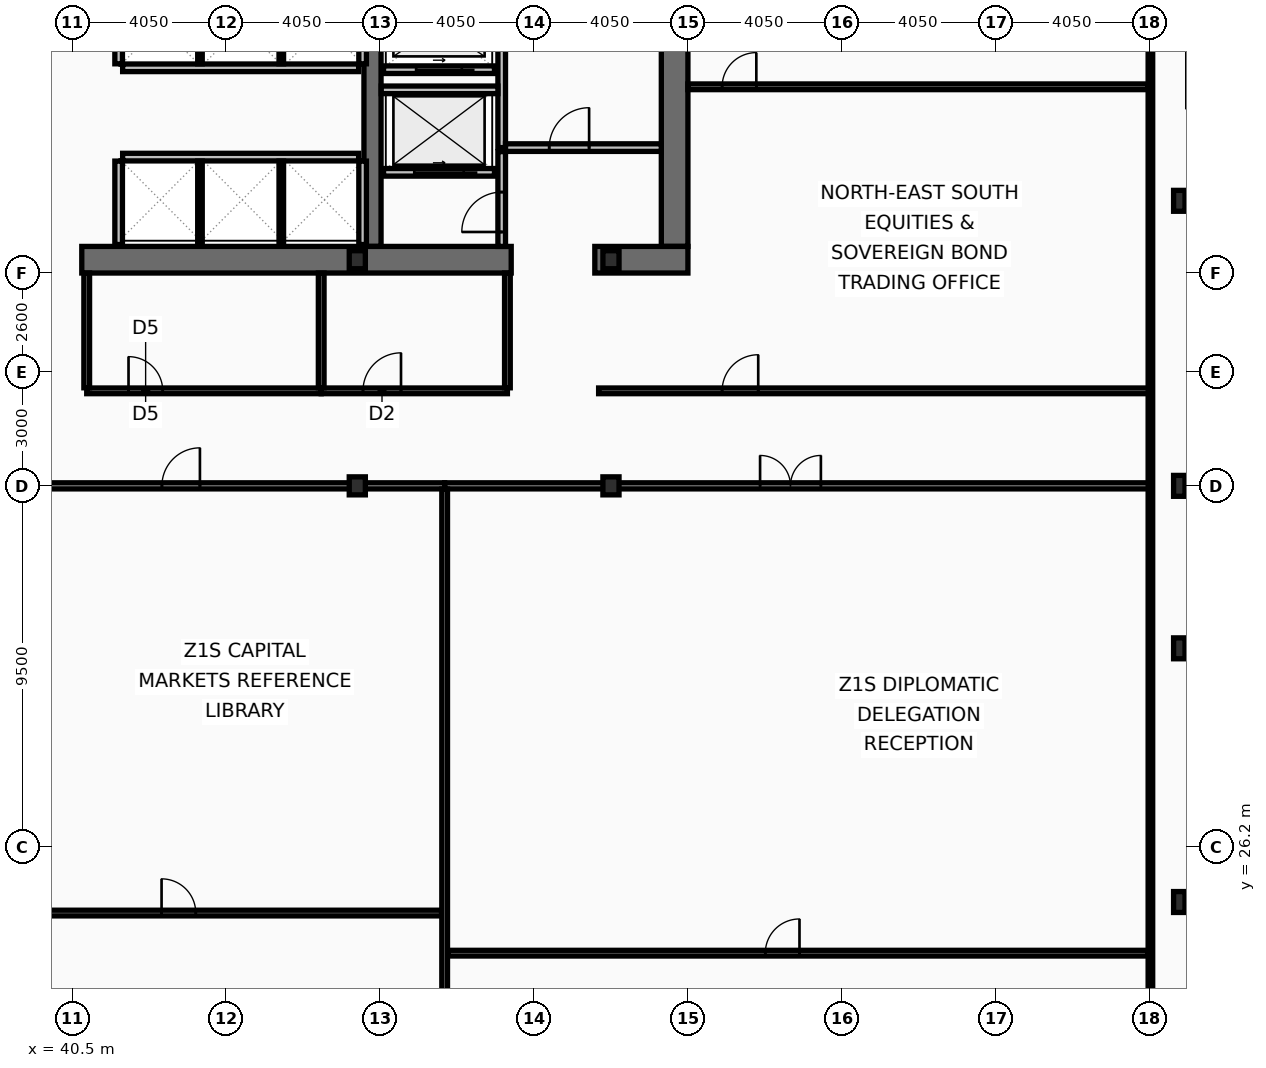
"""IFC4 building model, lengths in metres.
Left out: names, types, materials, properties, quantities, classifications, styles, units other than length and angle.
Written with IfcOpenShell. Run it as: python <this file> out.ifc"""

import sys

from ifc_helpers import new_model, si_unit, direction, frame, frame_2d, origin, origin_2d, place, context, subcontext, project, spatial, rectangle, i_section, extrude, element, fill, save


model = new_model("IFC4")
c1 = context("Model", 3, precision=1e-05, world=origin(), true_north=direction((0.0, 1.0)))
c2 = subcontext(c1, "Body", "Model", "MODEL_VIEW")
j1 = project(units=[si_unit("LENGTHUNIT", "METRE"), si_unit("PLANEANGLEUNIT", "RADIAN")], contexts=[c1])
p1 = place(None, origin())
s1 = spatial("IfcSite", under=j1, at=p1, CompositionType="ELEMENT")
p2 = place(p1, origin())
s2 = spatial("IfcBuilding", under=s1, at=p2, CompositionType="ELEMENT")
p3 = place(p2, frame((0.0, 0.0, 90.6)))
s3 = spatial("IfcBuildingStorey", under=s2, at=p3, CompositionType="ELEMENT", Elevation=90.6)
p4 = place(p3, frame((56.35, 53.0, 0.0), z_axis=(0.0, 0.0, 1.0), x_axis=(0.0, -1.0, 0.0)))
e1 = element("IfcWall", 1, at=p4, inside=s3, PredefinedType="SHEAR", context=c2, shape_type="SweptSolid", body=[
    extrude(rectangle(XDim=11.0, YDim=0.7, at=frame_2d((5.5, 0.0))), origin(), (0.0, 0.0, 1.0), 3.82),
])
p5 = place(p3, frame((48.4, 42.0, 0.0), z_axis=(0.0, 0.0, 1.0), x_axis=(0.0, 1.0, 0.0)))
e2 = element("IfcWall", 2, at=p5, inside=s3, PredefinedType="SHEAR", context=c2, shape_type="SweptSolid", body=[
    extrude(rectangle(XDim=11.0, YDim=0.45, at=frame_2d((5.5, 0.0))), origin(), (0.0, 0.0, 1.0), 3.82),
])
p6 = place(p3, frame((52.05, 41.65, 0.0), z_axis=(0.0, 0.0, 1.0), x_axis=(-1.0, 0.0, 0.0)))
e3 = element("IfcWall", 3, at=p6, inside=s3, PredefinedType="SHEAR", context=c2, shape_type="SweptSolid", body=[
    extrude(rectangle(XDim=11.3, YDim=0.7, at=frame_2d((5.65, 0.0))), origin(), (0.0, 0.0, 1.0), 3.82),
])
p7 = place(p3, frame((56.7, 41.65, 0.0), z_axis=(0.0, 0.0, 1.0), x_axis=(-1.0, 0.0, 0.0)))
e4 = element("IfcWall", 4, at=p7, inside=s3, PredefinedType="SHEAR", context=c2, shape_type="SweptSolid", body=[
    extrude(rectangle(XDim=2.45, YDim=0.7, at=frame_2d((1.225, 0.0))), origin(), (0.0, 0.0, 1.0), 3.82),
])
for number, where, z_axis, x_axis in (
    (5, (69.63, 24.75, 0.0), (0.0, 0.0, 1.0), (1.0, 0.0, 0.0)),
    (6, (69.63, 31.425, 0.0), (0.0, 0.0, 1.0), (1.0, 0.0, 0.0)),
    (7, (69.63, 35.7, 0.0), (0.0, 0.0, 1.0), (1.0, 0.0, 0.0)),
    (8, (69.63, 43.2, 0.0), (0.0, 0.0, 1.0), (1.0, 0.0, 0.0)),
):
    element("IfcColumn", number, at=place(p3, frame(where, z_axis=z_axis, x_axis=x_axis)), inside=s3, PredefinedType="COLUMN", context=c2, shape_type="SweptSolid", body=[
        extrude(i_section(OverallWidth=0.3, OverallDepth=0.55, WebThickness=0.015, FlangeThickness=0.029, at=origin_2d()), origin(), (0.0, 0.0, 1.0), 4.0),
    ])
for number, where, z_axis, x_axis in (
    (9, (48.0, 35.7, 0.0), (0.0, 0.0, 1.0), (1.0, 0.0, 0.0)),
    (10, (48.0, 41.65, 0.0), (0.0, 0.0, 1.0), (1.0, 0.0, 0.0)),
    (11, (54.675, 35.7, 0.0), (0.0, 0.0, 1.0), (1.0, 0.0, 0.0)),
    (12, (54.675, 41.65, 0.0), (0.0, 0.0, 1.0), (1.0, 0.0, 0.0)),
):
    element("IfcColumn", number, at=place(p3, frame(where, z_axis=z_axis, x_axis=x_axis)), inside=s3, PredefinedType="COLUMN", context=c2, shape_type="SweptSolid", body=[
        extrude(i_section(OverallWidth=0.424, OverallDepth=0.474, WebThickness=0.048, FlangeThickness=0.077, at=origin_2d()), origin(), (0.0, 0.0, 1.0), 4.0),
    ])
p8 = place(p3, frame((51.61, 43.95, 0.0), z_axis=(0.0, 0.0, 1.0), x_axis=(-1.0, 0.0, 0.0)))
e13 = element("IfcWall", 13, at=p8, inside=s3, PredefinedType="PARTITIONING", context=c2, shape_type="SweptSolid", body=[
    extrude(rectangle(XDim=2.92, YDim=0.2, at=frame_2d((1.46, 0.0))), origin(), (0.0, 0.0, 1.0), 3.82),
])
p9 = place(p8, frame((0.81, 0.0, 0.0)))
e14 = element("IfcOpeningElement", 14, at=p9, cuts=e13, PredefinedType="OPENING", context=c2, shape_type="SweptSolid", body=[
    extrude(rectangle(XDim=1.3, YDim=2.18, at=frame_2d((0.65, 1.09))), frame((0.0, 0.11, 0.0), z_axis=(0.0, -1.0, 0.0), x_axis=(1.0, 0.0, 0.0)), (0.0, 0.0, 1.0), 0.22),
])
p10 = place(p3, frame((51.61, 46.65, 0.0), z_axis=(0.0, 0.0, 1.0), x_axis=(-1.0, 0.0, 0.0)))
e15 = element("IfcWall", 15, at=p10, inside=s3, PredefinedType="PARTITIONING", context=c2, shape_type="SweptSolid", body=[
    extrude(rectangle(XDim=2.92, YDim=0.2, at=frame_2d((1.46, 0.0))), origin(), (0.0, 0.0, 1.0), 3.82),
])
p11 = place(p10, frame((0.86, 0.0, 0.0)))
e16 = element("IfcOpeningElement", 16, at=p11, cuts=e15, PredefinedType="OPENING", context=c2, shape_type="SweptSolid", body=[
    extrude(rectangle(XDim=1.2, YDim=2.18, at=frame_2d((0.6, 1.09))), frame((0.0, 0.11, 0.0), z_axis=(0.0, -1.0, 0.0), x_axis=(1.0, 0.0, 0.0)), (0.0, 0.0, 1.0), 0.22),
])
p12 = place(p3, frame((51.8, 44.6, 0.0), z_axis=(0.0, 0.0, 1.0), x_axis=(0.0, 1.0, 0.0)))
e17 = element("IfcWall", 17, at=p12, inside=s3, PredefinedType="PARTITIONING", context=c2, shape_type="SweptSolid", body=[
    extrude(rectangle(XDim=4.3, YDim=0.2, at=frame_2d((2.15, 0.0))), origin(), (0.0, 0.0, 1.0), 3.82),
])
p13 = place(p3, frame((51.9, 44.6, 0.0), z_axis=(0.0, 0.0, 1.0), x_axis=(1.0, 0.0, 0.0)))
e18 = element("IfcWall", 18, at=p13, inside=s3, PredefinedType="PARTITIONING", context=c2, shape_type="SweptSolid", body=[
    extrude(rectangle(XDim=4.1, YDim=0.2, at=frame_2d((2.05, 0.0))), origin(), (0.0, 0.0, 1.0), 3.82),
])
p14 = place(p13, frame((1.15, 0.0, 0.0)))
e19 = element("IfcOpeningElement", 19, at=p14, cuts=e18, PredefinedType="OPENING", context=c2, shape_type="SweptSolid", body=[
    extrude(rectangle(XDim=1.05, YDim=2.15, at=frame_2d((0.525, 1.075))), frame((0.0, 0.11, 0.0), z_axis=(0.0, -1.0, 0.0), x_axis=(1.0, 0.0, 0.0)), (0.0, 0.0, 1.0), 0.22),
])
p15 = place(p3, frame((48.63, 46.12, 0.0), z_axis=(0.0, 0.0, 1.0), x_axis=(1.0, 0.0, 0.0)))
e20 = element("IfcWall", 20, at=p15, inside=s3, PredefinedType="PARTITIONING", context=c2, shape_type="SweptSolid", body=[
    extrude(rectangle(XDim=3.07, YDim=0.2, at=frame_2d((1.535, 0.0))), origin(), (0.0, 0.0, 1.0), 3.82),
])
p16 = place(p3, frame((51.8, 42.0, 0.0), z_axis=(0.0, 0.0, 1.0), x_axis=(0.0, 1.0, 0.0)))
e21 = element("IfcWall", 21, at=p16, inside=s3, PredefinedType="PARTITIONING", context=c2, shape_type="SweptSolid", body=[
    extrude(rectangle(XDim=2.495, YDim=0.2, at=frame_2d((1.248, 0.0))), origin(), (0.0, 0.0, 1.0), 3.82),
])
p17 = place(p16, frame((0.38, 0.0, 0.0)))
e22 = element("IfcOpeningElement", 22, at=p17, cuts=e21, PredefinedType="OPENING", context=c2, shape_type="SweptSolid", body=[
    extrude(rectangle(XDim=1.05, YDim=2.15, at=frame_2d((0.525, 1.075))), frame((0.0, 0.11, 0.0), z_axis=(0.0, -1.0, 0.0), x_axis=(1.0, 0.0, 0.0)), (0.0, 0.0, 1.0), 0.22),
])
p18 = place(p3, frame((41.825, 46.7, 0.0), z_axis=(0.0, 0.0, 1.0), x_axis=(1.0, 0.0, 0.0)))
e23 = element("IfcWall", 23, at=p18, inside=s3, PredefinedType="PARTITIONING", context=c2, shape_type="SweptSolid", body=[
    extrude(rectangle(XDim=6.21, YDim=0.2, at=frame_2d((3.105, 0.0))), origin(), (0.0, 0.0, 1.0), 3.82),
])
for number, where, z_axis, x_axis in (
    (24, (41.72, 46.805, 0.0), (0.0, 0.0, 1.0), (0.0, 1.0, 0.0)),
    (25, (48.14, 46.805, 0.0), (0.0, 0.0, 1.0), (0.0, 1.0, 0.0)),
):
    element("IfcWall", number, at=place(p3, frame(where, z_axis=z_axis, x_axis=x_axis)), inside=s3, PredefinedType="PARTITIONING", context=c2, shape_type="SweptSolid", body=[
        extrude(rectangle(XDim=2.09, YDim=0.2, at=frame_2d((1.045, 0.0))), origin(), (0.0, 0.0, 1.0), 3.82),
    ])
for number, where, z_axis, x_axis in (
    (26, (43.86, 46.805, 0.0), (0.0, 0.0, 1.0), (0.0, 1.0, 0.0)),
    (27, (46.0, 46.805, 0.0), (0.0, 0.0, 1.0), (0.0, 1.0, 0.0)),
):
    element("IfcWall", number, at=place(p3, frame(where, z_axis=z_axis, x_axis=x_axis)), inside=s3, PredefinedType="PARTITIONING", context=c2, shape_type="SweptSolid", body=[
        extrude(rectangle(XDim=2.09, YDim=0.12, at=frame_2d((1.045, 0.0))), origin(), (0.0, 0.0, 1.0), 3.82),
    ])
p19 = place(p3, frame((41.825, 44.35, 0.0), z_axis=(0.0, 0.0, 1.0), x_axis=(1.0, 0.0, 0.0)))
e28 = element("IfcWall", 28, at=p19, inside=s3, PredefinedType="PARTITIONING", context=c2, shape_type="SweptSolid", body=[
    extrude(rectangle(XDim=6.21, YDim=0.2, at=frame_2d((3.105, 0.0))), origin(), (0.0, 0.0, 1.0), 3.82),
])
for number, where, z_axis, x_axis in (
    (29, (41.72, 42.05, 0.0), (0.0, 0.0, 1.0), (0.0, 1.0, 0.0)),
    (30, (48.14, 42.05, 0.0), (0.0, 0.0, 1.0), (0.0, 1.0, 0.0)),
):
    element("IfcWall", number, at=place(p3, frame(where, z_axis=z_axis, x_axis=x_axis)), inside=s3, PredefinedType="PARTITIONING", context=c2, shape_type="SweptSolid", body=[
        extrude(rectangle(XDim=2.195, YDim=0.2, at=frame_2d((1.098, 0.0))), origin(), (0.0, 0.0, 1.0), 3.82),
    ])
for number, where, z_axis, x_axis in (
    (31, (43.86, 42.05, 0.0), (0.0, 0.0, 1.0), (0.0, 1.0, 0.0)),
    (32, (46.0, 42.05, 0.0), (0.0, 0.0, 1.0), (0.0, 1.0, 0.0)),
):
    element("IfcWall", number, at=place(p3, frame(where, z_axis=z_axis, x_axis=x_axis)), inside=s3, PredefinedType="PARTITIONING", context=c2, shape_type="SweptSolid", body=[
        extrude(rectangle(XDim=2.195, YDim=0.12, at=frame_2d((1.098, 0.0))), origin(), (0.0, 0.0, 1.0), 3.82),
    ])
p20 = place(p3, frame((40.88, 38.2, 0.0), z_axis=(0.0, 0.0, 1.0), x_axis=(1.0, 0.0, 0.0)))
e33 = element("IfcWall", 33, at=p20, inside=s3, PredefinedType="PARTITIONING", context=c2, shape_type="SweptSolid", body=[
    extrude(rectangle(XDim=6.17, YDim=0.15, at=frame_2d((3.085, 0.0))), origin(), (0.0, 0.0, 1.0), 3.01),
])
p21 = place(p20, frame((1.1, 0.0, 0.0)))
e34 = element("IfcOpeningElement", 34, at=p21, cuts=e33, PredefinedType="OPENING", context=c2, shape_type="SweptSolid", body=[
    extrude(rectangle(XDim=0.9, YDim=2.05, at=frame_2d((0.45, 1.025))), frame((0.0, 0.085, 0.0), z_axis=(0.0, -1.0, 0.0), x_axis=(1.0, 0.0, 0.0)), (0.0, 0.0, 1.0), 0.17),
])
p22 = place(p3, frame((47.05, 38.2, 0.0), z_axis=(0.0, 0.0, 1.0), x_axis=(1.0, 0.0, 0.0)))
e35 = element("IfcWall", 35, at=p22, inside=s3, PredefinedType="PARTITIONING", context=c2, shape_type="SweptSolid", body=[
    extrude(rectangle(XDim=4.9, YDim=0.15, at=frame_2d((2.45, 0.0))), origin(), (0.0, 0.0, 1.0), 3.01),
])
p23 = place(p22, frame((1.1, 0.0, 0.0)))
e36 = element("IfcOpeningElement", 36, at=p23, cuts=e35, PredefinedType="OPENING", context=c2, shape_type="SweptSolid", body=[
    extrude(rectangle(XDim=1.0, YDim=2.05, at=frame_2d((0.5, 1.025))), frame((0.0, 0.085, 0.0), z_axis=(0.0, -1.0, 0.0), x_axis=(1.0, 0.0, 0.0)), (0.0, 0.0, 1.0), 0.17),
])
for number, where, z_axis, x_axis in (
    (37, (40.88, 38.28, 0.0), (0.0, 0.0, 1.0), (0.0, 1.0, 0.0)),
    (38, (47.05, 38.28, 0.0), (0.0, 0.0, 1.0), (0.0, 1.0, 0.0)),
    (39, (51.95, 38.28, 0.0), (0.0, 0.0, 1.0), (0.0, 1.0, 0.0)),
):
    element("IfcWall", number, at=place(p3, frame(where, z_axis=z_axis, x_axis=x_axis)), inside=s3, PredefinedType="PARTITIONING", context=c2, shape_type="SweptSolid", body=[
        extrude(rectangle(XDim=3.02, YDim=0.15, at=frame_2d((1.51, 0.0))), origin(), (0.0, 0.0, 1.0), 3.82),
    ])
p24 = place(p3, frame((54.35, 38.2, 0.0), z_axis=(0.0, 0.0, 1.0), x_axis=(1.0, 0.0, 0.0)))
e40 = element("IfcWall", 40, at=p24, inside=s3, PredefinedType="PARTITIONING", context=c2, shape_type="SweptSolid", body=[
    extrude(rectangle(XDim=14.52, YDim=0.15, at=frame_2d((7.26, 0.0))), origin(), (0.0, 0.0, 1.0), 3.01),
])
p25 = place(p24, frame((3.25, 0.0, 0.0)))
e41 = element("IfcOpeningElement", 41, at=p25, cuts=e40, PredefinedType="OPENING", context=c2, shape_type="SweptSolid", body=[
    extrude(rectangle(XDim=0.95, YDim=2.05, at=frame_2d((0.475, 1.025))), frame((0.0, 0.085, 0.0), z_axis=(0.0, -1.0, 0.0), x_axis=(1.0, 0.0, 0.0)), (0.0, 0.0, 1.0), 0.17),
])
p26 = place(p3, frame((56.7, 46.2, 0.0), z_axis=(0.0, 0.0, 1.0), x_axis=(1.0, 0.0, 0.0)))
e42 = element("IfcWall", 42, at=p26, inside=s3, PredefinedType="PARTITIONING", context=c2, shape_type="SweptSolid", body=[
    extrude(rectangle(XDim=12.105, YDim=0.15, at=frame_2d((6.052, 0.0))), origin(), (0.0, 0.0, 1.0), 3.16),
])
p27 = place(p26, frame((0.9, 0.0, 0.0)))
e43 = element("IfcOpeningElement", 43, at=p27, cuts=e42, PredefinedType="OPENING", context=c2, shape_type="SweptSolid", body=[
    extrude(rectangle(XDim=0.9, YDim=2.05, at=frame_2d((0.45, 1.025))), frame((0.0, 0.085, 0.0), z_axis=(0.0, -1.0, 0.0), x_axis=(1.0, 0.0, 0.0)), (0.0, 0.0, 1.0), 0.17),
])
p28 = place(p3, frame((36.609, 35.7, 0.0), z_axis=(0.0, 0.0, 1.0), x_axis=(1.0, 0.0, 0.0)))
e44 = element("IfcWall", 44, at=p28, inside=s3, PredefinedType="PARTITIONING", context=c2, shape_type="SweptSolid", body=[
    extrude(rectangle(XDim=13.69, YDim=0.16, at=frame_2d((6.845, 0.0))), origin(), (0.0, 0.0, 1.0), 3.01),
])
p29 = place(p28, frame((6.25, 0.0, 0.0)))
e45 = element("IfcOpeningElement", 45, at=p29, cuts=e44, PredefinedType="OPENING", context=c2, shape_type="SweptSolid", body=[
    extrude(rectangle(XDim=1.0, YDim=2.05, at=frame_2d((0.5, 1.025))), frame((0.0, 0.09, 0.0), z_axis=(0.0, -1.0, 0.0), x_axis=(1.0, 0.0, 0.0)), (0.0, 0.0, 1.0), 0.18),
])
p30 = place(p3, frame((36.689, 24.459, 0.0), z_axis=(0.0, 0.0, 1.0), x_axis=(1.0, 0.0, 0.0)))
e46 = element("IfcWall", 46, at=p30, inside=s3, PredefinedType="PARTITIONING", context=c2, shape_type="SweptSolid", body=[
    extrude(rectangle(XDim=13.53, YDim=0.15, at=frame_2d((6.765, 0.0))), origin(), (0.0, 0.0, 1.0), 3.01),
])
p31 = place(p30, frame((6.16, 0.0, 0.0)))
e47 = element("IfcOpeningElement", 47, at=p31, cuts=e46, PredefinedType="OPENING", context=c2, shape_type="SweptSolid", body=[
    extrude(rectangle(XDim=0.9, YDim=2.05, at=frame_2d((0.45, 1.025))), frame((0.0, 0.085, 0.0), z_axis=(0.0, -1.0, 0.0), x_axis=(1.0, 0.0, 0.0)), (0.0, 0.0, 1.0), 0.17),
])
p32 = place(p3, frame((50.299, 35.7, 0.0), z_axis=(0.0, 0.0, 1.0), x_axis=(1.0, 0.0, 0.0)))
e48 = element("IfcWall", 48, at=p32, inside=s3, PredefinedType="PARTITIONING", context=c2, shape_type="SweptSolid", body=[
    extrude(rectangle(XDim=18.571, YDim=0.16, at=frame_2d((9.286, 0.0))), origin(), (0.0, 0.0, 1.0), 3.01),
])
p33 = place(p32, frame((8.3, 0.0, 0.0)))
e49 = element("IfcOpeningElement", 49, at=p33, cuts=e48, PredefinedType="OPENING", context=c2, shape_type="SweptSolid", body=[
    extrude(rectangle(XDim=1.6, YDim=2.15, at=frame_2d((0.8, 1.075))), frame((0.0, 0.09, 0.0), z_axis=(0.0, -1.0, 0.0), x_axis=(1.0, 0.0, 0.0)), (0.0, 0.0, 1.0), 0.18),
])
p34 = place(p3, frame((50.299, 10.665, 0.0), z_axis=(0.0, 0.0, 1.0), x_axis=(0.0, 1.0, 0.0)))
e50 = element("IfcWall", 50, at=p34, inside=s3, PredefinedType="PARTITIONING", context=c2, shape_type="SweptSolid", body=[
    extrude(rectangle(XDim=24.95, YDim=0.15, at=frame_2d((12.475, 0.0))), origin(), (0.0, 0.0, 1.0), 3.26),
])
p35 = place(p3, frame((50.379, 23.404, 0.0), z_axis=(0.0, 0.0, 1.0), x_axis=(1.0, 0.0, 0.0)))
e51 = element("IfcWall", 51, at=p35, inside=s3, PredefinedType="PARTITIONING", context=c2, shape_type="SweptSolid", body=[
    extrude(rectangle(XDim=18.426, YDim=0.15, at=frame_2d((9.213, 0.0))), origin(), (0.0, 0.0, 1.0), 3.01),
])
p36 = place(p35, frame((8.357, 0.0, 0.0)))
e52 = element("IfcOpeningElement", 52, at=p36, cuts=e51, PredefinedType="OPENING", context=c2, shape_type="SweptSolid", body=[
    extrude(rectangle(XDim=0.9, YDim=2.05, at=frame_2d((0.45, 1.025))), frame((0.0, 0.085, 0.0), z_axis=(0.0, -1.0, 0.0), x_axis=(1.0, 0.0, 0.0)), (0.0, 0.0, 1.0), 0.17),
])
p37 = place(p3, frame((68.87, 10.665, 0.0), z_axis=(0.0, 0.0, 1.0), x_axis=(0.0, 1.0, 0.0)))
e53 = element("IfcWall", 53, at=p37, inside=s3, PredefinedType="PARTITIONING", context=c2, shape_type="SweptSolid", body=[
    extrude(rectangle(XDim=42.11, YDim=0.12, at=frame_2d((21.055, 0.0))), origin(), (0.0, 0.0, 1.0), 3.01),
])
p38 = place(p9, origin())
e54 = element("IfcDoor", 54, at=p38, inside=s3, OperationType="SLIDING_TO_LEFT", PredefinedType="DOOR", context=c2, shape_type="SweptSolid", body=[
    extrude(rectangle(XDim=1.3, YDim=2.18, at=frame_2d((0.65, 1.09))), frame((0.0, 0.025, 0.0), z_axis=(0.0, -1.0, 0.0), x_axis=(1.0, 0.0, 0.0)), (0.0, 0.0, 1.0), 0.05),
])
fill(e14, e54)
p39 = place(p11, origin())
e55 = element("IfcDoor", 55, at=p39, inside=s3, OperationType="SLIDING_TO_LEFT", PredefinedType="DOOR", context=c2, shape_type="SweptSolid", body=[
    extrude(rectangle(XDim=1.2, YDim=2.18, at=frame_2d((0.6, 1.09))), frame((0.0, 0.025, 0.0), z_axis=(0.0, -1.0, 0.0), x_axis=(1.0, 0.0, 0.0)), (0.0, 0.0, 1.0), 0.05),
])
fill(e16, e55)
p40 = place(p14, origin())
e56 = element("IfcDoor", 56, at=p40, inside=s3, OperationType="SINGLE_SWING_RIGHT", PredefinedType="DOOR", context=c2, shape_type="SweptSolid", body=[
    extrude(rectangle(XDim=1.05, YDim=2.15, at=frame_2d((0.525, 1.075))), frame((0.0, 0.025, 0.0), z_axis=(0.0, -1.0, 0.0), x_axis=(1.0, 0.0, 0.0)), (0.0, 0.0, 1.0), 0.05),
])
fill(e19, e56)
p41 = place(p17, origin())
e57 = element("IfcDoor", 57, at=p41, inside=s3, OperationType="SINGLE_SWING_LEFT", PredefinedType="DOOR", context=c2, shape_type="SweptSolid", body=[
    extrude(rectangle(XDim=1.05, YDim=2.15, at=frame_2d((0.525, 1.075))), frame((0.0, 0.025, 0.0), z_axis=(0.0, -1.0, 0.0), x_axis=(1.0, 0.0, 0.0)), (0.0, 0.0, 1.0), 0.05),
])
fill(e22, e57)
p42 = place(p21, origin())
e58 = element("IfcDoor", 58, at=p42, inside=s3, OperationType="SINGLE_SWING_LEFT", PredefinedType="DOOR", context=c2, shape_type="SweptSolid", body=[
    extrude(rectangle(XDim=0.9, YDim=2.05, at=frame_2d((0.45, 1.025))), frame((0.0, 0.025, 0.0), z_axis=(0.0, -1.0, 0.0), x_axis=(1.0, 0.0, 0.0)), (0.0, 0.0, 1.0), 0.05),
])
fill(e34, e58)
p43 = place(p23, origin())
e59 = element("IfcDoor", 59, at=p43, inside=s3, OperationType="SINGLE_SWING_RIGHT", PredefinedType="DOOR", context=c2, shape_type="SweptSolid", body=[
    extrude(rectangle(XDim=1.0, YDim=2.05, at=frame_2d((0.5, 1.025))), frame((0.0, 0.025, 0.0), z_axis=(0.0, -1.0, 0.0), x_axis=(1.0, 0.0, 0.0)), (0.0, 0.0, 1.0), 0.05),
])
fill(e36, e59)
p44 = place(p25, origin())
e60 = element("IfcDoor", 60, at=p44, inside=s3, OperationType="SINGLE_SWING_RIGHT", PredefinedType="DOOR", context=c2, shape_type="SweptSolid", body=[
    extrude(rectangle(XDim=0.95, YDim=2.05, at=frame_2d((0.475, 1.025))), frame((0.0, 0.025, 0.0), z_axis=(0.0, -1.0, 0.0), x_axis=(1.0, 0.0, 0.0)), (0.0, 0.0, 1.0), 0.05),
])
fill(e41, e60)
p45 = place(p27, origin())
e61 = element("IfcDoor", 61, at=p45, inside=s3, OperationType="SINGLE_SWING_RIGHT", PredefinedType="DOOR", context=c2, shape_type="SweptSolid", body=[
    extrude(rectangle(XDim=0.9, YDim=2.05, at=frame_2d((0.45, 1.025))), frame((0.0, 0.025, 0.0), z_axis=(0.0, -1.0, 0.0), x_axis=(1.0, 0.0, 0.0)), (0.0, 0.0, 1.0), 0.05),
])
fill(e43, e61)
p46 = place(p29, origin())
e62 = element("IfcDoor", 62, at=p46, inside=s3, OperationType="SINGLE_SWING_RIGHT", PredefinedType="DOOR", context=c2, shape_type="SweptSolid", body=[
    extrude(rectangle(XDim=1.0, YDim=2.05, at=frame_2d((0.5, 1.025))), frame((0.0, 0.025, 0.0), z_axis=(0.0, -1.0, 0.0), x_axis=(1.0, 0.0, 0.0)), (0.0, 0.0, 1.0), 0.05),
])
fill(e45, e62)
p47 = place(p31, origin())
e63 = element("IfcDoor", 63, at=p47, inside=s3, OperationType="SINGLE_SWING_LEFT", PredefinedType="DOOR", context=c2, shape_type="SweptSolid", body=[
    extrude(rectangle(XDim=0.9, YDim=2.05, at=frame_2d((0.45, 1.025))), frame((0.0, 0.025, 0.0), z_axis=(0.0, -1.0, 0.0), x_axis=(1.0, 0.0, 0.0)), (0.0, 0.0, 1.0), 0.05),
])
fill(e47, e63)
p48 = place(p33, origin())
e64 = element("IfcDoor", 64, at=p48, inside=s3, OperationType="DOUBLE_DOOR_SINGLE_SWING", PredefinedType="DOOR", context=c2, shape_type="SweptSolid", body=[
    extrude(rectangle(XDim=1.6, YDim=2.15, at=frame_2d((0.8, 1.075))), frame((0.0, 0.025, 0.0), z_axis=(0.0, -1.0, 0.0), x_axis=(1.0, 0.0, 0.0)), (0.0, 0.0, 1.0), 0.05),
])
fill(e49, e64)
p49 = place(p36, origin())
e65 = element("IfcDoor", 65, at=p49, inside=s3, OperationType="SINGLE_SWING_RIGHT", PredefinedType="DOOR", context=c2, shape_type="SweptSolid", body=[
    extrude(rectangle(XDim=0.9, YDim=2.05, at=frame_2d((0.45, 1.025))), frame((0.0, 0.025, 0.0), z_axis=(0.0, -1.0, 0.0), x_axis=(1.0, 0.0, 0.0)), (0.0, 0.0, 1.0), 0.05),
])
fill(e52, e65)
save(model, sys.argv[1])
